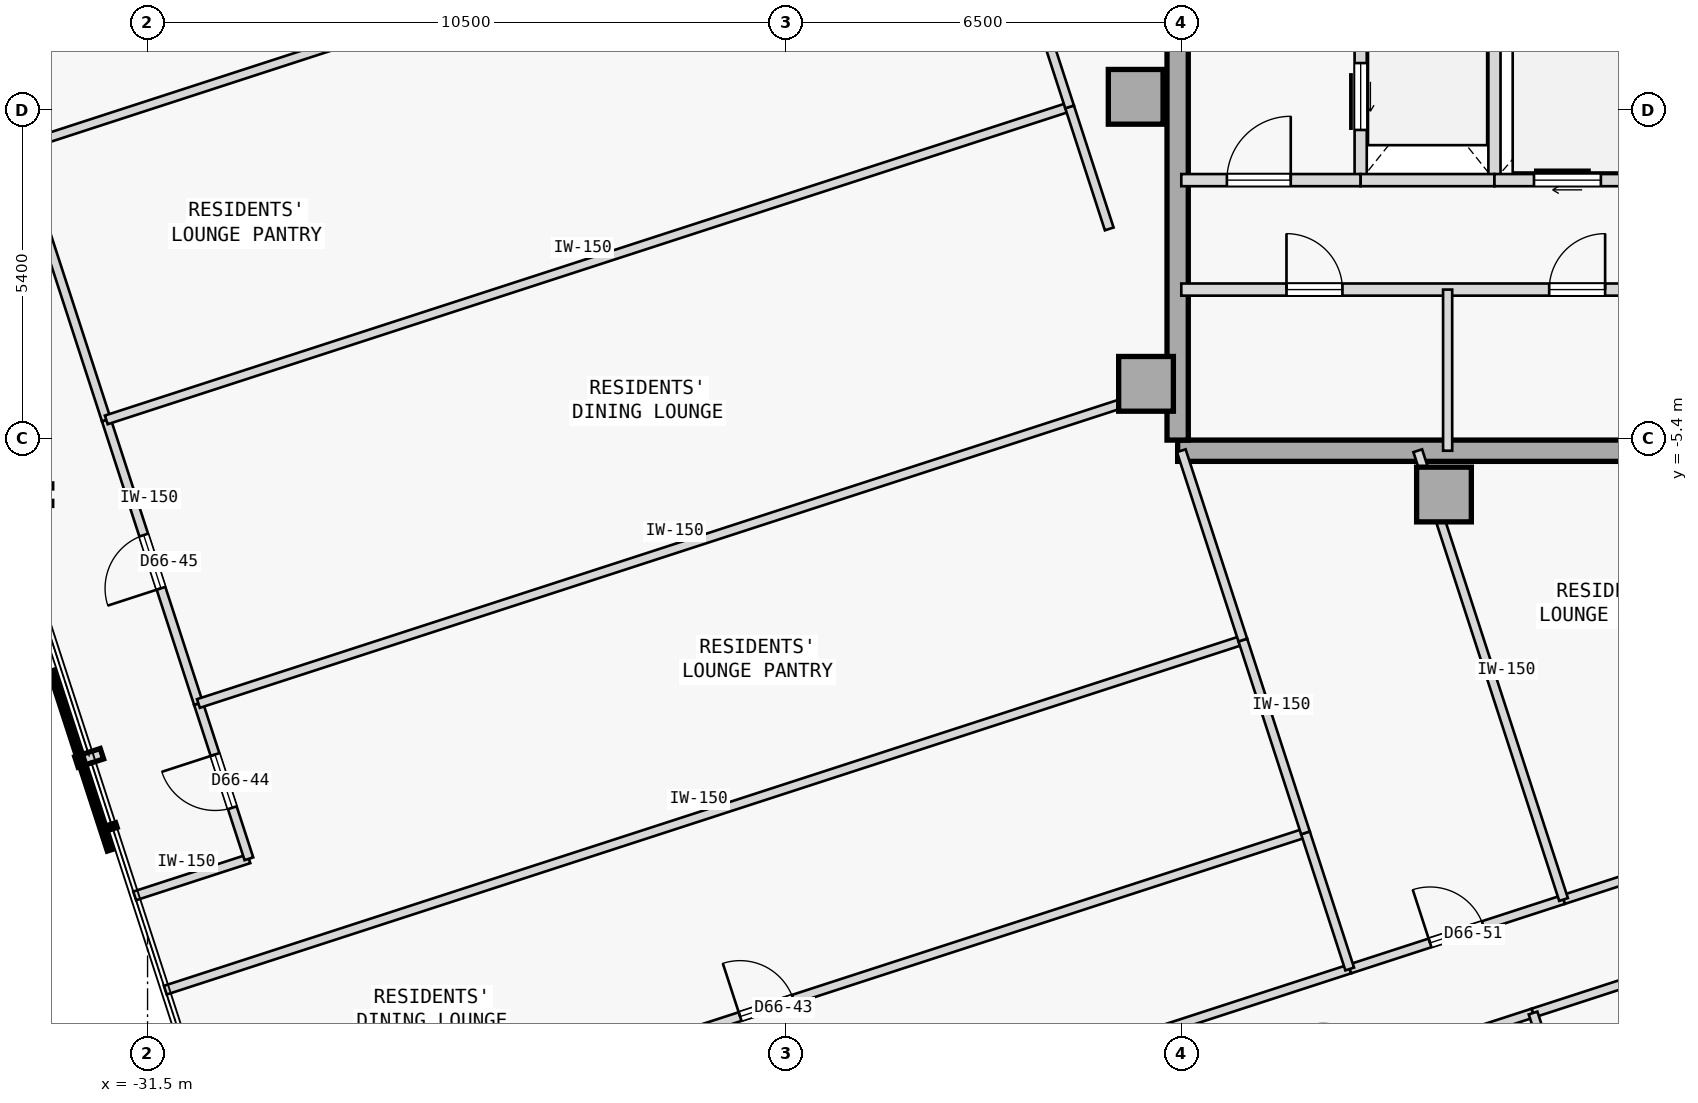
"""IFC4 building model, lengths in metres.
Left out: names, types, materials, properties, quantities, classifications, styles, units other than length and angle.
Written with IfcOpenShell. Run it as: python <this file> out.ifc"""

import sys

from ifc_helpers import new_model, si_unit, direction, frame, frame_2d, origin, origin_2d, place, context, subcontext, project, spatial, rectangle, extrude, element, fill, save


model = new_model("IFC4")
c1 = context("Model", 3, precision=1e-05, world=origin(), true_north=direction((0.0, 1.0)))
c2 = subcontext(c1, "Body", "Model", "MODEL_VIEW")
j1 = project(units=[si_unit("LENGTHUNIT", "METRE"), si_unit("PLANEANGLEUNIT", "RADIAN")], contexts=[c1])
p1 = place(None, origin())
s1 = spatial("IfcSite", under=j1, at=p1, CompositionType="ELEMENT")
p2 = place(p1, origin())
s2 = spatial("IfcBuilding", under=s1, at=p2, CompositionType="ELEMENT")
p3 = place(p2, frame((0.0, 0.0, 247.75)))
s3 = spatial("IfcBuildingStorey", under=s2, at=p3, CompositionType="ELEMENT", Elevation=247.75)
for number, where, z_axis, x_axis in (
    (1, (-15.25, 0.22, 0.0), (0.0, 0.0, 1.0), (1.0, 0.0, 0.0)),
    (2, (-15.08, -4.5, 0.0), (0.0, 0.0, 1.0), (1.0, 0.0, 0.0)),
    (3, (-10.18, -6.32, 0.0), (0.0, 0.0, 1.0), (1.0, 0.0, 0.0)),
):
    element("IfcColumn", number, at=place(p3, frame(where, z_axis=z_axis, x_axis=x_axis)), inside=s3, PredefinedType="COLUMN", context=c2, shape_type="SweptSolid", body=[
        extrude(rectangle(XDim=0.9, YDim=0.9, at=origin_2d()), origin(), (0.0, 0.0, 1.0), 3.35),
    ])
p4 = place(p3, frame((-14.56, -5.6, 0.0), z_axis=(0.0, 0.0, 1.0), x_axis=(1.0, 0.0, 0.0)))
e4 = element("IfcWall", 4, at=p4, inside=s3, PredefinedType="SHEAR", context=c2, shape_type="SweptSolid", body=[
    extrude(rectangle(XDim=10.86, YDim=0.35, at=frame_2d((5.43, 0.0))), origin(), (0.0, 0.0, 1.0), 3.125),
])
p5 = place(p3, frame((-14.56, -5.425, 0.0), z_axis=(0.0, 0.0, 1.0), x_axis=(0.0, 1.0, 0.0)))
e5 = element("IfcWall", 5, at=p5, inside=s3, PredefinedType="SHEAR", context=c2, shape_type="SweptSolid", body=[
    extrude(rectangle(XDim=10.85, YDim=0.35, at=frame_2d((5.425, 0.0))), origin(), (0.0, 0.0, 1.0), 3.125),
])
p6 = place(p3, frame((-11.55, -1.15, 0.0), z_axis=(0.0, 0.0, 1.0), x_axis=(0.0, 1.0, 0.0)))
e6 = element("IfcWall", 6, at=p6, inside=s3, PredefinedType="STANDARD", context=c2, shape_type="SweptSolid", body=[
    extrude(rectangle(XDim=2.75, YDim=0.2, at=frame_2d((1.375, 0.0))), origin(), (0.0, 0.0, 1.0), 3.125),
])
p7 = place(p6, frame((0.825, 0.0, 0.0)))
e7 = element("IfcOpeningElement", 7, at=p7, cuts=e6, PredefinedType="OPENING", context=c2, shape_type="SweptSolid", body=[
    extrude(rectangle(XDim=1.1, YDim=2.15, at=frame_2d((0.55, 1.075))), frame((0.0, 0.11, 0.0), z_axis=(0.0, -1.0, 0.0), x_axis=(1.0, 0.0, 0.0)), (0.0, 0.0, 1.0), 0.22),
])
p8 = place(p3, frame((-9.35, -1.15, 0.0), z_axis=(0.0, 0.0, 1.0), x_axis=(0.0, 1.0, 0.0)))
e8 = element("IfcWall", 8, at=p8, inside=s3, PredefinedType="STANDARD", context=c2, shape_type="SweptSolid", body=[
    extrude(rectangle(XDim=2.75, YDim=0.2, at=frame_2d((1.375, 0.0))), origin(), (0.0, 0.0, 1.0), 3.125),
])
p9 = place(p3, frame((-14.5, -1.15, 0.0), z_axis=(0.0, 0.0, 1.0), x_axis=(1.0, 0.0, 0.0)))
e9 = element("IfcWall", 9, at=p9, inside=s3, PredefinedType="STANDARD", context=c2, shape_type="SweptSolid", body=[
    extrude(rectangle(XDim=2.95, YDim=0.2, at=frame_2d((1.475, 0.0))), origin(), (0.0, 0.0, 1.0), 3.125),
])
p10 = place(p9, frame((0.75, 0.0, 0.0)))
e10 = element("IfcOpeningElement", 10, at=p10, cuts=e9, PredefinedType="OPENING", context=c2, shape_type="SweptSolid", body=[
    extrude(rectangle(XDim=1.05, YDim=2.18, at=frame_2d((0.525, 1.09))), frame((0.0, 0.11, 0.0), z_axis=(0.0, -1.0, 0.0), x_axis=(1.0, 0.0, 0.0)), (0.0, 0.0, 1.0), 0.22),
])
p11 = place(p3, frame((-11.55, -1.15, 0.0), z_axis=(0.0, 0.0, 1.0), x_axis=(1.0, 0.0, 0.0)))
e11 = element("IfcWall", 11, at=p11, inside=s3, PredefinedType="STANDARD", context=c2, shape_type="SweptSolid", body=[
    extrude(rectangle(XDim=2.2, YDim=0.2, at=frame_2d((1.1, 0.0))), origin(), (0.0, 0.0, 1.0), 3.125),
])
p12 = place(p3, frame((-9.35, -1.15, 0.0), z_axis=(0.0, 0.0, 1.0), x_axis=(1.0, 0.0, 0.0)))
e12 = element("IfcWall", 12, at=p12, inside=s3, PredefinedType="STANDARD", context=c2, shape_type="SweptSolid", body=[
    extrude(rectangle(XDim=2.4, YDim=0.2, at=frame_2d((1.2, 0.0))), origin(), (0.0, 0.0, 1.0), 3.125),
])
p13 = place(p12, frame((0.65, 0.0, 0.0)))
e13 = element("IfcOpeningElement", 13, at=p13, cuts=e12, PredefinedType="OPENING", context=c2, shape_type="SweptSolid", body=[
    extrude(rectangle(XDim=1.1, YDim=2.15, at=frame_2d((0.55, 1.075))), frame((0.0, 0.11, 0.0), z_axis=(0.0, -1.0, 0.0), x_axis=(1.0, 0.0, 0.0)), (0.0, 0.0, 1.0), 0.22),
])
p14 = place(p3, frame((-14.5, -2.95, 0.0), z_axis=(0.0, 0.0, 1.0), x_axis=(1.0, 0.0, 0.0)))
e14 = element("IfcWall", 14, at=p14, inside=s3, PredefinedType="STANDARD", context=c2, shape_type="SweptSolid", body=[
    extrude(rectangle(XDim=10.8, YDim=0.2, at=frame_2d((5.4, 0.0))), origin(), (0.0, 0.0, 1.0), 3.125),
])
p15 = place(p14, frame((9.17, 0.0, 0.0)))
e15 = element("IfcOpeningElement", 15, at=p15, cuts=e14, PredefinedType="OPENING", context=c2, shape_type="SweptSolid", body=[
    extrude(rectangle(XDim=1.1, YDim=2.15, at=frame_2d((0.55, 1.075))), frame((0.0, 0.11, 0.0), z_axis=(0.0, -1.0, 0.0), x_axis=(1.0, 0.0, 0.0)), (0.0, 0.0, 1.0), 0.22),
])
p16 = place(p14, frame((1.73, 0.0, 0.0)))
e16 = element("IfcOpeningElement", 16, at=p16, cuts=e14, PredefinedType="OPENING", context=c2, shape_type="SweptSolid", body=[
    extrude(rectangle(XDim=0.92, YDim=2.15, at=frame_2d((0.46, 1.075))), frame((0.0, 0.11, 0.0), z_axis=(0.0, -1.0, 0.0), x_axis=(1.0, 0.0, 0.0)), (0.0, 0.0, 1.0), 0.22),
])
p17 = place(p14, frame((6.05, 0.0, 0.0)))
e17 = element("IfcOpeningElement", 17, at=p17, cuts=e14, PredefinedType="OPENING", context=c2, shape_type="SweptSolid", body=[
    extrude(rectangle(XDim=0.92, YDim=2.15, at=frame_2d((0.46, 1.075))), frame((0.0, 0.11, 0.0), z_axis=(0.0, -1.0, 0.0), x_axis=(1.0, 0.0, 0.0)), (0.0, 0.0, 1.0), 0.22),
])
p18 = place(p3, frame((-10.12, -5.6, 0.0), z_axis=(0.0, 0.0, 1.0), x_axis=(0.0, 1.0, 0.0)))
e18 = element("IfcWall", 18, at=p18, inside=s3, PredefinedType="PARTITIONING", context=c2, shape_type="SweptSolid", body=[
    extrude(rectangle(XDim=2.65, YDim=0.15, at=frame_2d((1.325, 0.0))), origin(), (0.0, 0.0, 1.0), 3.125),
])
p19 = place(p3, frame((-36.012, 0.314, 0.0), z_axis=(0.0, 0.0, 1.0), x_axis=(0.951054850325, 0.309022121658, 0.0)))
e19 = element("IfcWall", 19, at=p19, inside=s3, PredefinedType="PARTITIONING", context=c2, shape_type="SweptSolid", body=[
    extrude(rectangle(XDim=7.165, YDim=0.15, at=frame_2d((3.583, 0.0))), origin(), (0.0, 0.0, 1.0), 3.125),
])
p20 = place(p3, frame((-14.709, -16.794, 0.0), z_axis=(0.0, 0.0, 1.0), x_axis=(0.951050295235, 0.309036140172, 0.0)))
e20 = element("IfcWall", 20, at=p20, inside=s3, PredefinedType="PARTITIONING", context=c2, shape_type="SweptSolid", body=[
    extrude(rectangle(XDim=6.302, YDim=0.15, at=frame_2d((3.151, 0.0))), origin(), (0.0, 0.0, 1.0), 3.125),
])
p21 = place(p20, frame((2.676, 0.0, 0.0)))
e21 = element("IfcOpeningElement", 21, at=p21, cuts=e20, PredefinedType="OPENING", context=c2, shape_type="SweptSolid", body=[
    extrude(rectangle(XDim=0.95, YDim=2.15, at=frame_2d((0.475, 1.075))), frame((0.0, 0.085, 0.0), z_axis=(0.0, -1.0, 0.0), x_axis=(1.0, 0.0, 0.0)), (0.0, 0.0, 1.0), 0.17),
])
p22 = place(p3, frame((-8.715, -14.847, 0.0), z_axis=(0.0, 0.0, 1.0), x_axis=(0.951061767293, 0.309000832997, 0.0)))
e22 = element("IfcWall", 22, at=p22, inside=s3, PredefinedType="PARTITIONING", context=c2, shape_type="SweptSolid", body=[
    extrude(rectangle(XDim=4.404, YDim=0.15, at=frame_2d((2.202, 0.0))), origin(), (0.0, 0.0, 1.0), 3.125),
])
p23 = place(p3, frame((-29.45, -19.881, 0.0), z_axis=(0.0, 0.0, 1.0), x_axis=(0.95105650271, 0.309017036186, 0.0)))
e23 = element("IfcWall", 23, at=p23, inside=s3, PredefinedType="PARTITIONING", context=c2, shape_type="SweptSolid", body=[
    extrude(rectangle(XDim=18.632, YDim=0.15, at=frame_2d((9.316, 0.0))), origin(), (0.0, 0.0, 1.0), 3.125),
])
p24 = place(p23, frame((8.856, 0.0, 0.0)))
e24 = element("IfcOpeningElement", 24, at=p24, cuts=e23, PredefinedType="OPENING", context=c2, shape_type="SweptSolid", body=[
    extrude(rectangle(XDim=0.92, YDim=2.15, at=frame_2d((0.46, 1.075))), frame((0.0, 0.085, 0.0), z_axis=(0.0, -1.0, 0.0), x_axis=(1.0, 0.0, 0.0)), (0.0, 0.0, 1.0), 0.17),
])
p25 = place(p3, frame((-31.712, -12.921, 0.0), z_axis=(0.0, 0.0, 1.0), x_axis=(0.951054051148, 0.309024581215, 0.0)))
e25 = element("IfcWall", 25, at=p25, inside=s3, PredefinedType="PARTITIONING", context=c2, shape_type="SweptSolid", body=[
    extrude(rectangle(XDim=1.975, YDim=0.15, at=frame_2d((0.988, 0.0))), origin(), (0.0, 0.0, 1.0), 3.125),
])
p26 = place(p3, frame((-29.833, -12.311, 0.0), z_axis=(0.0, 0.0, 1.0), x_axis=(-0.309044953986, 0.951047431213, 0.0)))
e26 = element("IfcWall", 26, at=p26, inside=s3, PredefinedType="PARTITIONING", context=c2, shape_type="SweptSolid", body=[
    extrude(rectangle(XDim=2.685, YDim=0.15, at=frame_2d((1.343, 0.0))), origin(), (0.0, 0.0, 1.0), 3.125),
])
p27 = place(p26, frame((0.883, 0.0, 0.0)))
e27 = element("IfcOpeningElement", 27, at=p27, cuts=e26, PredefinedType="OPENING", context=c2, shape_type="SweptSolid", body=[
    extrude(rectangle(XDim=0.92, YDim=2.15, at=frame_2d((0.46, 1.075))), frame((0.0, 0.085, 0.0), z_axis=(0.0, -1.0, 0.0), x_axis=(1.0, 0.0, 0.0)), (0.0, 0.0, 1.0), 0.17),
])
p28 = place(p3, frame((-30.663, -9.757, 0.0), z_axis=(0.0, 0.0, 1.0), x_axis=(-0.309019653166, 0.951055652397, 0.0)))
e28 = element("IfcWall", 28, at=p28, inside=s3, PredefinedType="PARTITIONING", context=c2, shape_type="SweptSolid", body=[
    extrude(rectangle(XDim=4.904, YDim=0.15, at=frame_2d((2.452, 0.0))), origin(), (0.0, 0.0, 1.0), 3.125),
])
p29 = place(p28, frame((1.992, 0.0, 0.0)))
e29 = element("IfcOpeningElement", 29, at=p29, cuts=e28, PredefinedType="OPENING", context=c2, shape_type="SweptSolid", body=[
    extrude(rectangle(XDim=0.92, YDim=2.15, at=frame_2d((0.46, 1.075))), frame((0.0, 0.085, 0.0), z_axis=(0.0, -1.0, 0.0), x_axis=(1.0, 0.0, 0.0)), (0.0, 0.0, 1.0), 0.17),
])
p30 = place(p3, frame((-32.179, -5.093, 0.0), z_axis=(0.0, 0.0, 1.0), x_axis=(-0.309014532869, 0.951057316083, 0.0)))
e30 = element("IfcWall", 30, at=p30, inside=s3, PredefinedType="PARTITIONING", context=c2, shape_type="SweptSolid", body=[
    extrude(rectangle(XDim=4.707, YDim=0.15, at=frame_2d((2.354, 0.0))), origin(), (0.0, 0.0, 1.0), 3.125),
])
p31 = place(p3, frame((-33.633, -0.616, 0.0), z_axis=(0.0, 0.0, 1.0), x_axis=(0.951058192995, 0.309011833974, 0.0)))
e31 = element("IfcWall", 31, at=p31, inside=s3, PredefinedType="PARTITIONING", context=c2, shape_type="SweptSolid", body=[
    extrude(rectangle(XDim=16.657, YDim=0.15, at=frame_2d((8.329, 0.0))), origin(), (0.0, 0.0, 1.0), 3.125),
])
p32 = place(p31, frame((7.868, 0.0, 0.0)))
e32 = element("IfcOpeningElement", 32, at=p32, cuts=e31, PredefinedType="OPENING", context=c2, shape_type="SweptSolid", body=[
    extrude(rectangle(XDim=0.92, YDim=2.15, at=frame_2d((0.46, 1.075))), frame((0.0, 0.085, 0.0), z_axis=(0.0, -1.0, 0.0), x_axis=(1.0, 0.0, 0.0)), (0.0, 0.0, 1.0), 0.17),
])
p33 = place(p3, frame((-11.73, -14.123, 0.0), z_axis=(0.0, 0.0, 1.0), x_axis=(0.951052502763, 0.309029346483, 0.0)))
e33 = element("IfcWall", 33, at=p33, inside=s3, PredefinedType="PARTITIONING", context=c2, shape_type="SweptSolid", body=[
    extrude(rectangle(XDim=3.698, YDim=0.15, at=frame_2d((1.849, 0.0))), origin(), (0.0, 0.0, 1.0), 3.125),
])
p34 = place(p33, frame((1.389, 0.0, 0.0)))
e34 = element("IfcOpeningElement", 34, at=p34, cuts=e33, PredefinedType="OPENING", context=c2, shape_type="SweptSolid", body=[
    extrude(rectangle(XDim=0.92, YDim=2.15, at=frame_2d((0.46, 1.075))), frame((0.0, 0.085, 0.0), z_axis=(0.0, -1.0, 0.0), x_axis=(1.0, 0.0, 0.0)), (0.0, 0.0, 1.0), 0.17),
])
p35 = place(p3, frame((-8.213, -12.98, 0.0), z_axis=(0.0, 0.0, 1.0), x_axis=(0.951058260096, 0.309011627456, 0.0)))
e35 = element("IfcWall", 35, at=p35, inside=s3, PredefinedType="PARTITIONING", context=c2, shape_type="SweptSolid", body=[
    extrude(rectangle(XDim=4.746, YDim=0.15, at=frame_2d((2.373, 0.0))), origin(), (0.0, 0.0, 1.0), 3.125),
])
p36 = place(p3, frame((-5.668, -24.226, 0.0), z_axis=(0.0, 0.0, 1.0), x_axis=(-0.309022258842, 0.95105480575, 0.0)))
e36 = element("IfcWall", 36, at=p36, inside=s3, PredefinedType="PARTITIONING", context=c2, shape_type="SweptSolid", body=[
    extrude(rectangle(XDim=9.862, YDim=0.15, at=frame_2d((4.931, 0.0))), origin(), (0.0, 0.0, 1.0), 3.125),
])
p37 = place(p3, frame((-30.178, -17.642, 0.0), z_axis=(0.0, 0.0, 1.0), x_axis=(0.95105650271, 0.309017036186, 0.0)))
e37 = element("IfcWall", 37, at=p37, inside=s3, PredefinedType="PARTITIONING", context=c2, shape_type="SweptSolid", body=[
    extrude(rectangle(XDim=18.632, YDim=0.15, at=frame_2d((9.316, 0.0))), origin(), (0.0, 0.0, 1.0), 3.125),
])
p38 = place(p37, frame((8.856, 0.0, 0.0)))
e38 = element("IfcOpeningElement", 38, at=p38, cuts=e37, PredefinedType="OPENING", context=c2, shape_type="SweptSolid", body=[
    extrude(rectangle(XDim=0.92, YDim=2.15, at=frame_2d((0.46, 1.075))), frame((0.0, 0.085, 0.0), z_axis=(0.0, -1.0, 0.0), x_axis=(1.0, 0.0, 0.0)), (0.0, 0.0, 1.0), 0.17),
])
p39 = place(p3, frame((-11.73, -14.123, 0.0), z_axis=(0.0, 0.0, 1.0), x_axis=(-0.309062621189, 0.951041690035, 0.0)))
e39 = element("IfcWall", 39, at=p39, inside=s3, PredefinedType="PARTITIONING", context=c2, shape_type="SweptSolid", body=[
    extrude(rectangle(XDim=2.354, YDim=0.15, at=frame_2d((1.177, 0.0))), origin(), (0.0, 0.0, 1.0), 3.125),
])
p40 = place(p3, frame((-31.208, -14.471, 0.0), z_axis=(0.0, 0.0, 1.0), x_axis=(0.951057753948, 0.309013185244, 0.0)))
e40 = element("IfcWall", 40, at=p40, inside=s3, PredefinedType="PARTITIONING", context=c2, shape_type="SweptSolid", body=[
    extrude(rectangle(XDim=18.632, YDim=0.15, at=frame_2d((9.316, 0.0))), origin(), (0.0, 0.0, 1.0), 3.125),
])
p41 = place(p3, frame((-12.458, -11.884, 0.0), z_axis=(0.0, 0.0, 1.0), x_axis=(-0.308946982245, 0.951079261766, 0.0)))
e41 = element("IfcWall", 41, at=p41, inside=s3, PredefinedType="PARTITIONING", context=c2, shape_type="SweptSolid", body=[
    extrude(rectangle(XDim=3.334, YDim=0.15, at=frame_2d((1.667, 0.0))), origin(), (0.0, 0.0, 1.0), 3.125),
])
p42 = place(p3, frame((-30.663, -9.757, 0.0), z_axis=(0.0, 0.0, 1.0), x_axis=(0.951058192995, 0.309011833974, 0.0)))
e42 = element("IfcWall", 42, at=p42, inside=s3, PredefinedType="PARTITIONING", context=c2, shape_type="SweptSolid", body=[
    extrude(rectangle(XDim=16.657, YDim=0.15, at=frame_2d((8.329, 0.0))), origin(), (0.0, 0.0, 1.0), 3.125),
])
p43 = place(p3, frame((-13.488, -8.713, 0.0), z_axis=(0.0, 0.0, 1.0), x_axis=(-0.309082700143, 0.951035164687, 0.0)))
e43 = element("IfcWall", 43, at=p43, inside=s3, PredefinedType="PARTITIONING", context=c2, shape_type="SweptSolid", body=[
    extrude(rectangle(XDim=3.274, YDim=0.15, at=frame_2d((1.637, 0.0))), origin(), (0.0, 0.0, 1.0), 3.125),
])
p44 = place(p3, frame((-32.179, -5.093, 0.0), z_axis=(0.0, 0.0, 1.0), x_axis=(0.951053885426, 0.309025091239, 0.0)))
e44 = element("IfcWall", 44, at=p44, inside=s3, PredefinedType="PARTITIONING", context=c2, shape_type="SweptSolid", body=[
    extrude(rectangle(XDim=16.657, YDim=0.15, at=frame_2d((8.329, 0.0))), origin(), (0.0, 0.0, 1.0), 3.125),
])
p45 = place(p3, frame((-15.685, -1.952, 0.0), z_axis=(0.0, 0.0, 1.0), x_axis=(-0.308929092959, 0.951085072706, 0.0)))
e45 = element("IfcWall", 45, at=p45, inside=s3, PredefinedType="PARTITIONING", context=c2, shape_type="SweptSolid", body=[
    extrude(rectangle(XDim=2.11, YDim=0.15, at=frame_2d((1.055, 0.0))), origin(), (0.0, 0.0, 1.0), 3.125),
])
p46 = place(p3, frame((-16.337, 0.054, 0.0), z_axis=(0.0, 0.0, 1.0), x_axis=(-0.309029776355, 0.951052363083, 0.0)))
e46 = element("IfcWall", 46, at=p46, inside=s3, PredefinedType="PARTITIONING", context=c2, shape_type="SweptSolid", body=[
    extrude(rectangle(XDim=4.707, YDim=0.15, at=frame_2d((2.354, 0.0))), origin(), (0.0, 0.0, 1.0), 3.125),
])
p47 = place(p3, frame((-8.213, -12.98, 0.0), z_axis=(0.0, 0.0, 1.0), x_axis=(-0.309017065592, 0.951056493155, 0.0)))
e47 = element("IfcWall", 47, at=p47, inside=s3, PredefinedType="PARTITIONING", context=c2, shape_type="SweptSolid", body=[
    extrude(rectangle(XDim=7.76, YDim=0.15, at=frame_2d((3.88, 0.0))), origin(), (0.0, 0.0, 1.0), 3.125),
])
p48 = place(p10, origin())
e48 = element("IfcDoor", 48, at=p48, inside=s3, OperationType="SINGLE_SWING_RIGHT", PredefinedType="DOOR", context=c2, shape_type="SweptSolid", body=[
    extrude(rectangle(XDim=1.05, YDim=2.18, at=frame_2d((0.525, 1.09))), frame((0.0, 0.025, 0.0), z_axis=(0.0, -1.0, 0.0), x_axis=(1.0, 0.0, 0.0)), (0.0, 0.0, 1.0), 0.05),
])
fill(e10, e48)
p49 = place(p7, origin())
e49 = element("IfcDoor", 49, at=p49, inside=s3, OperationType="SLIDING_TO_RIGHT", PredefinedType="DOOR", context=c2, shape_type="SweptSolid", body=[
    extrude(rectangle(XDim=1.1, YDim=2.15, at=frame_2d((0.55, 1.075))), frame((0.0, 0.025, 0.0), z_axis=(0.0, -1.0, 0.0), x_axis=(1.0, 0.0, 0.0)), (0.0, 0.0, 1.0), 0.05),
])
fill(e7, e49)
p50 = place(p13, origin())
e50 = element("IfcDoor", 50, at=p50, inside=s3, OperationType="SLIDING_TO_RIGHT", PredefinedType="DOOR", context=c2, shape_type="SweptSolid", body=[
    extrude(rectangle(XDim=1.1, YDim=2.15, at=frame_2d((0.55, 1.075))), frame((0.0, 0.025, 0.0), z_axis=(0.0, -1.0, 0.0), x_axis=(1.0, 0.0, 0.0)), (0.0, 0.0, 1.0), 0.05),
])
fill(e13, e50)
p51 = place(p16, origin())
e51 = element("IfcDoor", 51, at=p51, inside=s3, OperationType="SINGLE_SWING_LEFT", PredefinedType="DOOR", context=c2, shape_type="SweptSolid", body=[
    extrude(rectangle(XDim=0.92, YDim=2.15, at=frame_2d((0.46, 1.075))), frame((0.0, 0.025, 0.0), z_axis=(0.0, -1.0, 0.0), x_axis=(1.0, 0.0, 0.0)), (0.0, 0.0, 1.0), 0.05),
])
fill(e16, e51)
p52 = place(p17, origin())
e52 = element("IfcDoor", 52, at=p52, inside=s3, OperationType="SINGLE_SWING_RIGHT", PredefinedType="DOOR", context=c2, shape_type="SweptSolid", body=[
    extrude(rectangle(XDim=0.92, YDim=2.15, at=frame_2d((0.46, 1.075))), frame((0.0, 0.025, 0.0), z_axis=(0.0, -1.0, 0.0), x_axis=(1.0, 0.0, 0.0)), (0.0, 0.0, 1.0), 0.05),
])
fill(e17, e52)
p53 = place(p38, origin())
e53 = element("IfcDoor", 53, at=p53, inside=s3, OperationType="SINGLE_SWING_LEFT", PredefinedType="DOOR", context=c2, shape_type="SweptSolid", body=[
    extrude(rectangle(XDim=0.92, YDim=2.15, at=frame_2d((0.46, 1.075))), frame((0.0, 0.025, 0.0), z_axis=(0.0, -1.0, 0.0), x_axis=(1.0, 0.0, 0.0)), (0.0, 0.0, 1.0), 0.05),
])
fill(e38, e53)
p54 = place(p27, origin())
e54 = element("IfcDoor", 54, at=p54, inside=s3, OperationType="SINGLE_SWING_RIGHT", PredefinedType="DOOR", context=c2, shape_type="SweptSolid", body=[
    extrude(rectangle(XDim=0.92, YDim=2.15, at=frame_2d((0.46, 1.075))), frame((0.0, 0.025, 0.0), z_axis=(0.0, -1.0, 0.0), x_axis=(1.0, 0.0, 0.0)), (0.0, 0.0, 1.0), 0.05),
])
fill(e27, e54)
p55 = place(p29, origin())
e55 = element("IfcDoor", 55, at=p55, inside=s3, OperationType="SINGLE_SWING_LEFT", PredefinedType="DOOR", context=c2, shape_type="SweptSolid", body=[
    extrude(rectangle(XDim=0.92, YDim=2.15, at=frame_2d((0.46, 1.075))), frame((0.0, 0.025, 0.0), z_axis=(0.0, -1.0, 0.0), x_axis=(1.0, 0.0, 0.0)), (0.0, 0.0, 1.0), 0.05),
])
fill(e29, e55)
p56 = place(p34, origin())
e56 = element("IfcDoor", 56, at=p56, inside=s3, OperationType="SINGLE_SWING_LEFT", PredefinedType="DOOR", context=c2, shape_type="SweptSolid", body=[
    extrude(rectangle(XDim=0.92, YDim=2.15, at=frame_2d((0.46, 1.075))), frame((0.0, 0.025, 0.0), z_axis=(0.0, -1.0, 0.0), x_axis=(1.0, 0.0, 0.0)), (0.0, 0.0, 1.0), 0.05),
])
fill(e34, e56)
save(model, sys.argv[1])
